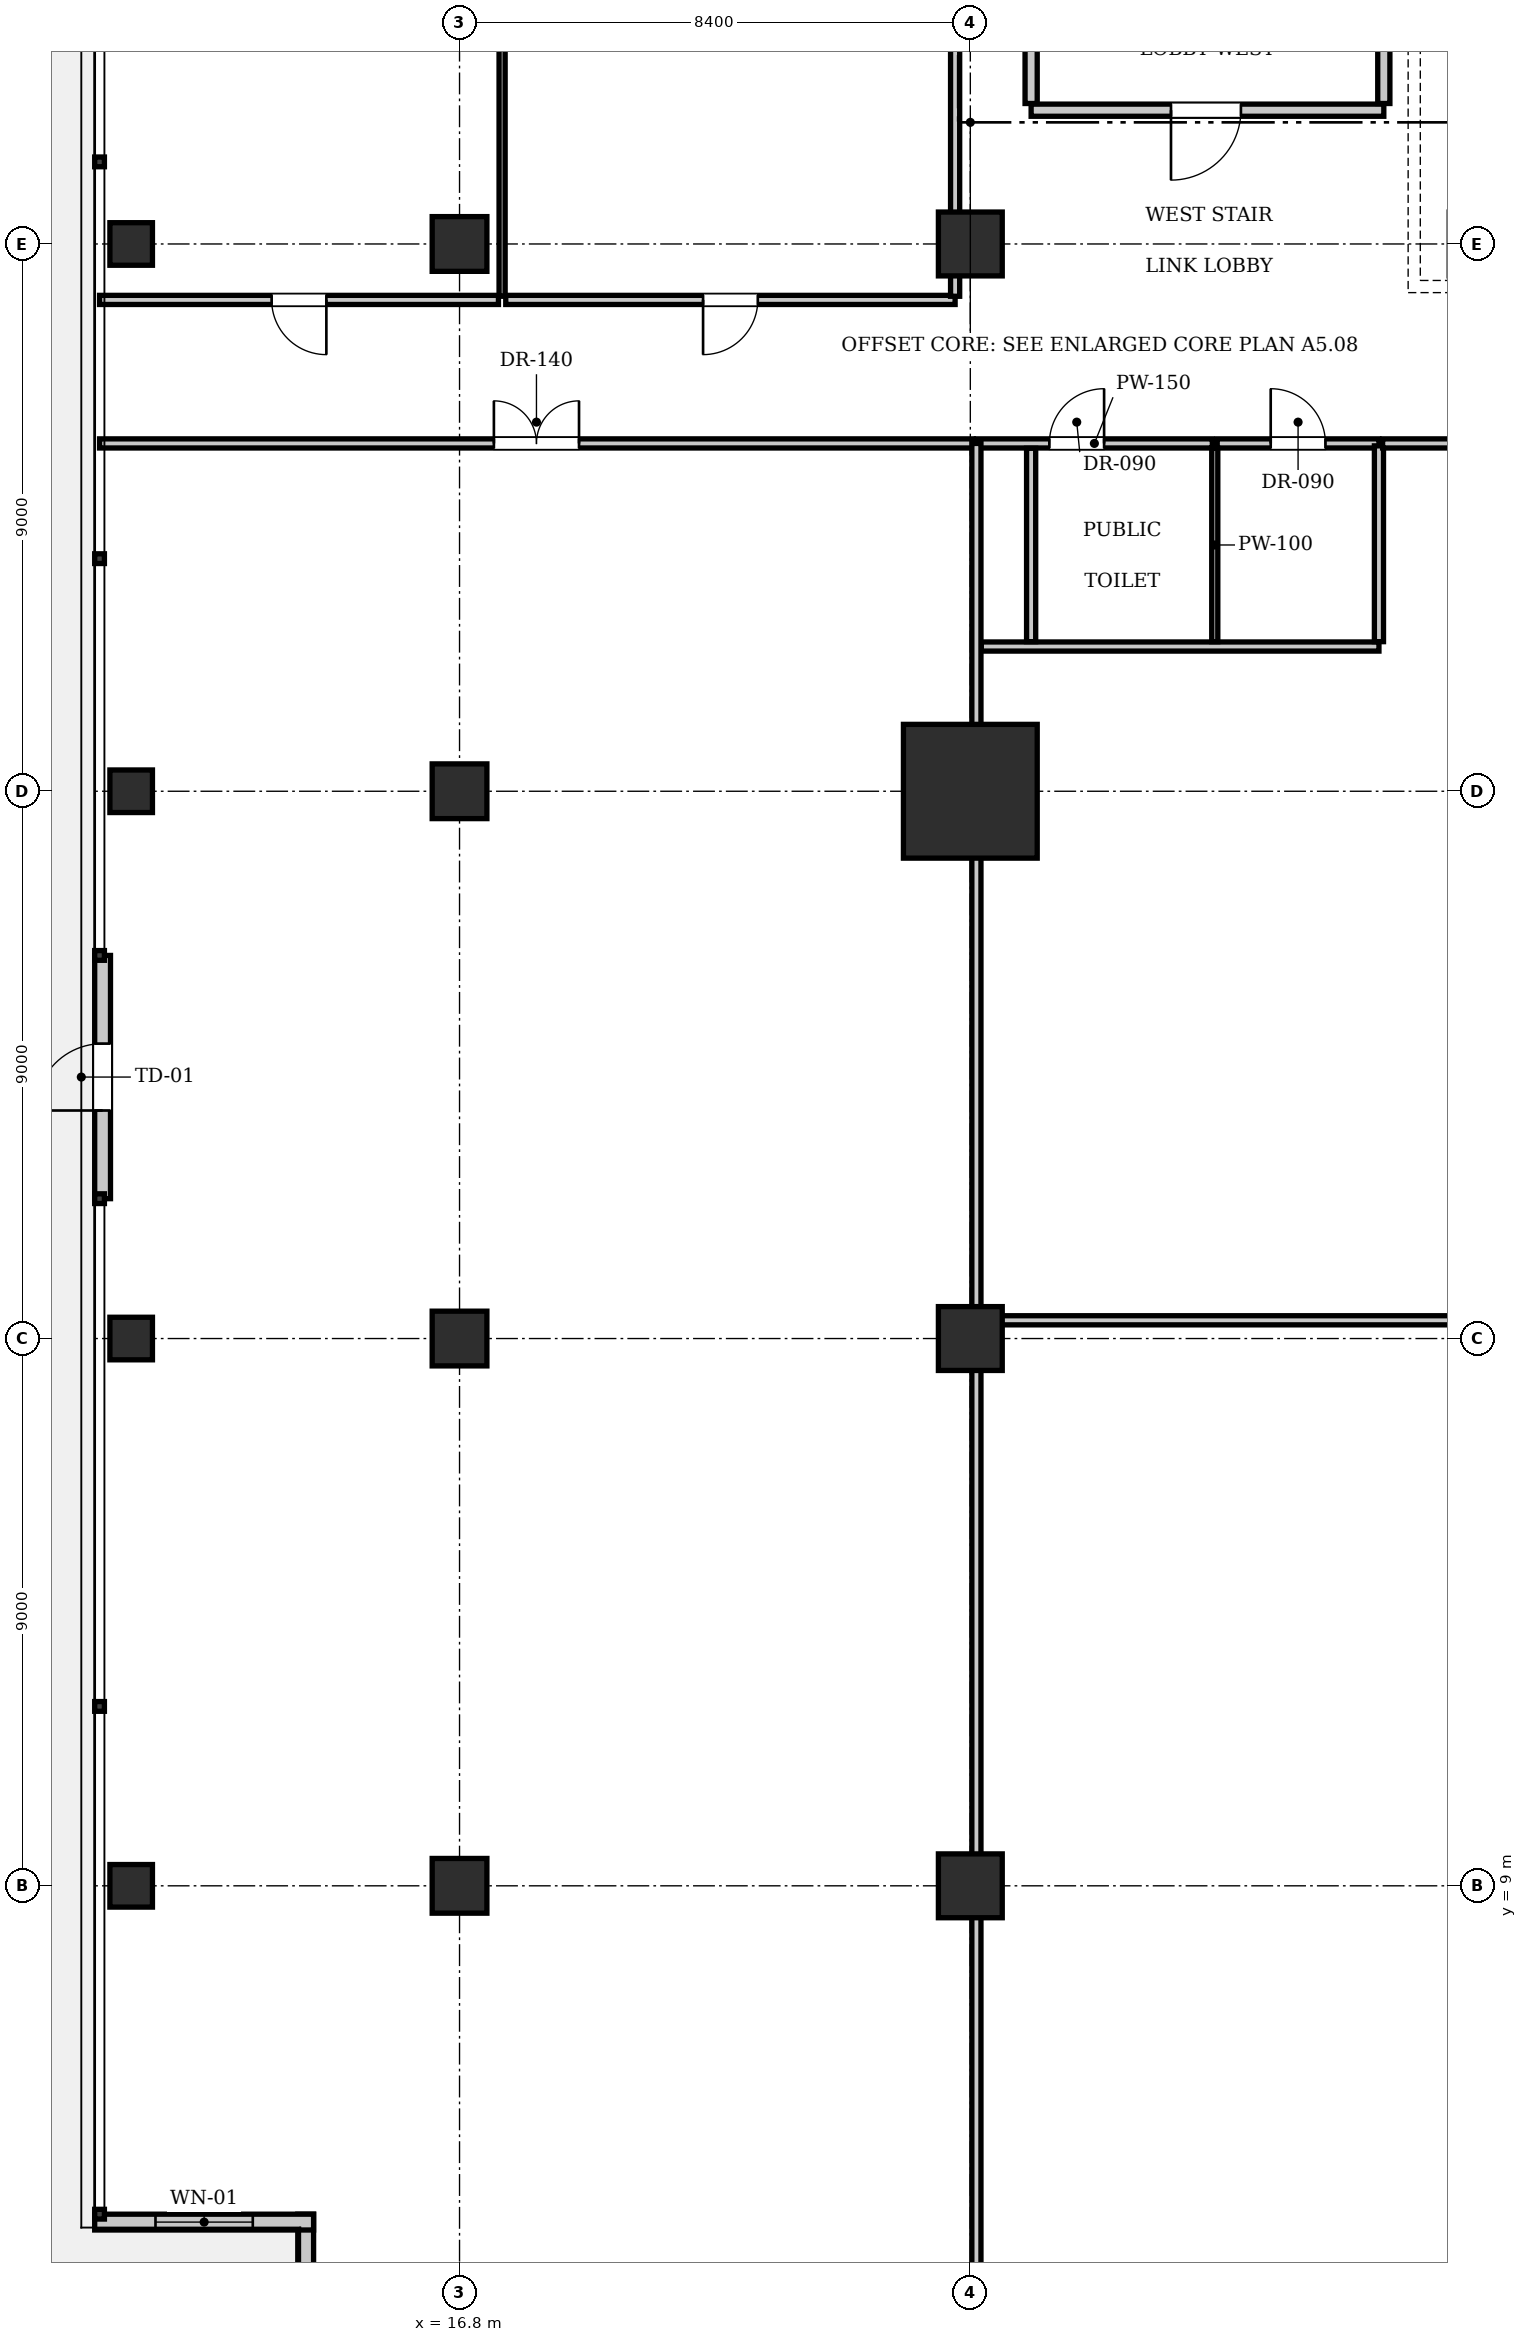
"""IFC4 building model, lengths in metres.
Left out: names, types, materials, properties, quantities, classifications, styles, units other than length and angle.
Written with IfcOpenShell. Run it as: python <this file> out.ifc"""

import sys

from ifc_helpers import new_model, si_unit, direction, frame, frame_2d, origin, origin_2d, place, context, subcontext, project, spatial, rectangle, i_section, extrude, element, fill, save


model = new_model("IFC4")
c1 = context("Model", 3, precision=1e-05, world=origin(), true_north=direction((0.0, 1.0)))
c2 = subcontext(c1, "Body", "Model", "MODEL_VIEW")
j1 = project(units=[si_unit("LENGTHUNIT", "METRE"), si_unit("PLANEANGLEUNIT", "RADIAN")], contexts=[c1])
p1 = place(None, origin())
s1 = spatial("IfcSite", under=j1, at=p1, CompositionType="ELEMENT")
p2 = place(p1, origin())
s2 = spatial("IfcBuilding", under=s1, at=p2, CompositionType="ELEMENT")
p3 = place(p2, frame((0.0, 0.0, 26.95)))
s3 = spatial("IfcBuildingStorey", under=s2, at=p3, CompositionType="ELEMENT", Elevation=26.95)
p4 = place(p3, frame((25.2, 27.0, 0.0), z_axis=(0.0, 0.0, 1.0), x_axis=(1.0, 0.0, 0.0)))
e1 = element("IfcColumn", 1, at=p4, inside=s3, PredefinedType="COLUMN", context=c2, shape_type="SweptSolid", body=[
    extrude(rectangle(XDim=2.2, YDim=2.2, at=origin_2d()), origin(), (0.0, 0.0, 1.0), 3.85),
])
for number, where, z_axis, x_axis in (
    (2, (25.2, 36.0, 0.0), (0.0, 0.0, 1.0), (1.0, 0.0, 0.0)),
    (3, (25.2, 18.0, 0.0), (0.0, 0.0, 1.0), (1.0, 0.0, 0.0)),
    (4, (25.2, 9.0, 0.0), (0.0, 0.0, 1.0), (1.0, 0.0, 0.0)),
):
    element("IfcColumn", number, at=place(p3, frame(where, z_axis=z_axis, x_axis=x_axis)), inside=s3, PredefinedType="COLUMN", context=c2, shape_type="SweptSolid", body=[
        extrude(rectangle(XDim=1.05, YDim=1.05, at=origin_2d()), origin(), (0.0, 0.0, 1.0), 3.85),
    ])
for number, where, z_axis, x_axis in (
    (5, (16.8, 9.0, 0.0), (0.0, 0.0, 1.0), (1.0, 0.0, 0.0)),
    (6, (16.8, 18.0, 0.0), (0.0, 0.0, 1.0), (1.0, 0.0, 0.0)),
    (7, (16.8, 27.0, 0.0), (0.0, 0.0, 1.0), (1.0, 0.0, 0.0)),
    (8, (16.8, 36.0, 0.0), (0.0, 0.0, 1.0), (1.0, 0.0, 0.0)),
):
    element("IfcColumn", number, at=place(p3, frame(where, z_axis=z_axis, x_axis=x_axis)), inside=s3, PredefinedType="COLUMN", context=c2, shape_type="SweptSolid", body=[
        extrude(rectangle(XDim=0.9, YDim=0.9, at=origin_2d()), origin(), (0.0, 0.0, 1.0), 3.85),
    ])
for number, where, z_axis, x_axis in (
    (9, (11.4, 9.0, -0.24), (0.0, 0.0, 1.0), (1.0, 0.0, 0.0)),
    (10, (11.4, 18.0, -0.24), (0.0, 0.0, 1.0), (1.0, 0.0, 0.0)),
    (11, (11.4, 27.0, -0.24), (0.0, 0.0, 1.0), (1.0, 0.0, 0.0)),
    (12, (11.4, 36.0, -0.24), (0.0, 0.0, 1.0), (1.0, 0.0, 0.0)),
):
    element("IfcColumn", number, at=place(p3, frame(where, z_axis=z_axis, x_axis=x_axis)), inside=s3, PredefinedType="COLUMN", context=c2, shape_type="SweptSolid", body=[
        extrude(i_section(OverallWidth=0.7, OverallDepth=0.7, WebThickness=0.028, FlangeThickness=0.044, at=origin_2d()), origin(), (0.0, 0.0, 1.0), 4.09),
    ])
p5 = place(p3, frame((14.27, 0.0, 0.0), z_axis=(0.0, 0.0, 1.0), x_axis=(0.0, 1.0, 0.0)))
e13 = element("IfcWall", 13, at=p5, inside=s3, PredefinedType="SOLIDWALL", context=c2, shape_type="SweptSolid", body=[
    extrude(rectangle(XDim=3.6, YDim=0.26, at=frame_2d((1.8, 0.0))), origin(), (0.0, 0.0, 1.0), 3.61),
])
p6 = place(p3, frame((14.4, 3.47, 0.0), z_axis=(0.0, 0.0, 1.0), x_axis=(-1.0, 0.0, 0.0)))
e14 = element("IfcWall", 14, at=p6, inside=s3, PredefinedType="SOLIDWALL", context=c2, shape_type="SweptSolid", body=[
    extrude(rectangle(XDim=3.6, YDim=0.26, at=frame_2d((1.8, 0.0))), origin(), (0.0, 0.0, 1.0), 3.61),
])
p7 = place(p6, frame((1.0, 0.0, 0.9)))
e15 = element("IfcOpeningElement", 15, at=p7, cuts=e14, PredefinedType="OPENING", context=c2, shape_type="SweptSolid", body=[
    extrude(rectangle(XDim=1.6, YDim=2.1, at=frame_2d((0.8, 1.05))), frame((0.0, 0.14, 0.0), z_axis=(0.0, -1.0, 0.0), x_axis=(1.0, 0.0, 0.0)), (0.0, 0.0, 1.0), 0.28),
])
p8 = place(p3, frame((10.93, 20.3, 0.0), z_axis=(0.0, 0.0, 1.0), x_axis=(0.0, 1.0, 0.0)))
e16 = element("IfcWall", 16, at=p8, inside=s3, PredefinedType="SOLIDWALL", context=c2, shape_type="SweptSolid", body=[
    extrude(rectangle(XDim=4.0, YDim=0.26, at=frame_2d((2.0, 0.0))), origin(), (0.0, 0.0, 1.0), 3.61),
])
p9 = place(p8, frame((1.45, 0.0, 0.0)))
e17 = element("IfcOpeningElement", 17, at=p9, cuts=e16, PredefinedType="OPENING", context=c2, shape_type="SweptSolid", body=[
    extrude(rectangle(XDim=1.1, YDim=2.2, at=frame_2d((0.55, 1.1))), frame((0.0, 0.14, 0.0), z_axis=(0.0, -1.0, 0.0), x_axis=(1.0, 0.0, 0.0)), (0.0, 0.0, 1.0), 0.28),
])
p10 = place(p3, frame((26.2, 38.2, 0.0), z_axis=(0.0, 0.0, 1.0), x_axis=(1.0, 0.0, 0.0)))
e18 = element("IfcWall", 18, at=p10, inside=s3, PredefinedType="PARTITIONING", context=c2, shape_type="SweptSolid", body=[
    extrude(rectangle(XDim=5.8, YDim=0.2, at=frame_2d((2.9, 0.0))), origin(), (0.0, 0.0, 1.0), 3.61),
])
p11 = place(p10, frame((2.3, 0.0, 0.0)))
e19 = element("IfcOpeningElement", 19, at=p11, cuts=e18, PredefinedType="OPENING", context=c2, shape_type="SweptSolid", body=[
    extrude(rectangle(XDim=1.15, YDim=2.15, at=frame_2d((0.575, 1.075))), frame((0.0, 0.11, 0.0), z_axis=(0.0, -1.0, 0.0), x_axis=(1.0, 0.0, 0.0)), (0.0, 0.0, 1.0), 0.22),
])
for number, where, z_axis, x_axis in (
    (20, (26.2, 38.31, 0.0), (0.0, 0.0, 1.0), (0.0, 1.0, 0.0)),
    (21, (32.0, 38.31, 0.0), (0.0, 0.0, 1.0), (0.0, 1.0, 0.0)),
):
    element("IfcWall", number, at=place(p3, frame(where, z_axis=z_axis, x_axis=x_axis)), inside=s3, PredefinedType="PARTITIONING", context=c2, shape_type="SweptSolid", body=[
        extrude(rectangle(XDim=3.07, YDim=0.2, at=frame_2d((1.535, 0.0))), origin(), (0.0, 0.0, 1.0), 3.61),
    ])
p12 = place(p3, frame((25.3, 32.72, 0.0), z_axis=(0.0, 0.0, 1.0), x_axis=(1.0, 0.0, 0.0)))
e22 = element("IfcWall", 22, at=p12, inside=s3, PredefinedType="PARTITIONING", context=c2, shape_type="SweptSolid", body=[
    extrude(rectangle(XDim=3.88, YDim=0.15, at=frame_2d((1.94, 0.0))), origin(), (0.0, 0.0, 1.0), 3.61),
])
p13 = place(p12, frame((1.2, 0.0, 0.0)))
e23 = element("IfcOpeningElement", 23, at=p13, cuts=e22, PredefinedType="OPENING", context=c2, shape_type="SweptSolid", body=[
    extrude(rectangle(XDim=0.9, YDim=2.1, at=frame_2d((0.45, 1.05))), frame((0.0, 0.085, 0.0), z_axis=(0.0, -1.0, 0.0), x_axis=(1.0, 0.0, 0.0)), (0.0, 0.0, 1.0), 0.17),
])
p14 = place(p3, frame((29.26, 32.72, 0.0), z_axis=(0.0, 0.0, 1.0), x_axis=(1.0, 0.0, 0.0)))
e24 = element("IfcWall", 24, at=p14, inside=s3, PredefinedType="PARTITIONING", context=c2, shape_type="SweptSolid", body=[
    extrude(rectangle(XDim=2.66, YDim=0.15, at=frame_2d((1.33, 0.0))), origin(), (0.0, 0.0, 1.0), 3.61),
])
p15 = place(p14, frame((0.88, 0.0, 0.0)))
e25 = element("IfcOpeningElement", 25, at=p15, cuts=e24, PredefinedType="OPENING", context=c2, shape_type="SweptSolid", body=[
    extrude(rectangle(XDim=0.9, YDim=2.1, at=frame_2d((0.45, 1.05))), frame((0.0, 0.085, 0.0), z_axis=(0.0, -1.0, 0.0), x_axis=(1.0, 0.0, 0.0)), (0.0, 0.0, 1.0), 0.17),
])
p16 = place(p3, frame((25.38, 29.38, 0.0), z_axis=(0.0, 0.0, 1.0), x_axis=(1.0, 0.0, 0.0)))
e26 = element("IfcWall", 26, at=p16, inside=s3, PredefinedType="PARTITIONING", context=c2, shape_type="SweptSolid", body=[
    extrude(rectangle(XDim=6.54, YDim=0.15, at=frame_2d((3.27, 0.0))), origin(), (0.0, 0.0, 1.0), 3.61),
])
p17 = place(p3, frame((26.2, 29.46, 0.0), z_axis=(0.0, 0.0, 1.0), x_axis=(0.0, 1.0, 0.0)))
e27 = element("IfcWall", 27, at=p17, inside=s3, PredefinedType="PARTITIONING", context=c2, shape_type="SweptSolid", body=[
    extrude(rectangle(XDim=3.18, YDim=0.15, at=frame_2d((1.59, 0.0))), origin(), (0.0, 0.0, 1.0), 3.61),
])
p18 = place(p3, frame((29.22, 29.46, 0.0), z_axis=(0.0, 0.0, 1.0), x_axis=(0.0, 1.0, 0.0)))
e28 = element("IfcWall", 28, at=p18, inside=s3, PredefinedType="PARTITIONING", context=c2, shape_type="SweptSolid", body=[
    extrude(rectangle(XDim=3.18, YDim=0.1, at=frame_2d((1.59, 0.0))), origin(), (0.0, 0.0, 1.0), 3.61),
])
p19 = place(p3, frame((31.92, 29.46, 0.0), z_axis=(0.0, 0.0, 1.0), x_axis=(0.0, 1.0, 0.0)))
e29 = element("IfcWall", 29, at=p19, inside=s3, PredefinedType="PARTITIONING", context=c2, shape_type="SweptSolid", body=[
    extrude(rectangle(XDim=3.22, YDim=0.15, at=frame_2d((1.61, 0.0))), origin(), (0.0, 0.0, 1.0), 3.61),
])
p20 = place(p3, frame((25.38, 18.3, 0.0), z_axis=(0.0, 0.0, 1.0), x_axis=(1.0, 0.0, 0.0)))
e30 = element("IfcWall", 30, at=p20, inside=s3, PredefinedType="PARTITIONING", context=c2, shape_type="SweptSolid", body=[
    extrude(rectangle(XDim=24.84, YDim=0.15, at=frame_2d((12.42, 0.0))), origin(), (0.0, 0.0, 1.0), 3.61),
])
p21 = place(p20, frame((9.0, 0.0, 0.0)))
e31 = element("IfcOpeningElement", 31, at=p21, cuts=e30, PredefinedType="OPENING", context=c2, shape_type="SweptSolid", body=[
    extrude(rectangle(XDim=1.4, YDim=2.2, at=frame_2d((0.7, 1.1))), frame((0.0, 0.085, 0.0), z_axis=(0.0, -1.0, 0.0), x_axis=(1.0, 0.0, 0.0)), (0.0, 0.0, 1.0), 0.17),
])
p22 = place(p3, frame((10.88, 32.72, 0.0), z_axis=(0.0, 0.0, 1.0), x_axis=(1.0, 0.0, 0.0)))
e32 = element("IfcWall", 32, at=p22, inside=s3, PredefinedType="PARTITIONING", context=c2, shape_type="SweptSolid", body=[
    extrude(rectangle(XDim=14.37, YDim=0.15, at=frame_2d((7.185, 0.0))), origin(), (0.0, 0.0, 1.0), 3.61),
])
p23 = place(p22, frame((6.485, 0.0, 0.0)))
e33 = element("IfcOpeningElement", 33, at=p23, cuts=e32, PredefinedType="OPENING", context=c2, shape_type="SweptSolid", body=[
    extrude(rectangle(XDim=1.4, YDim=2.2, at=frame_2d((0.7, 1.1))), frame((0.0, 0.085, 0.0), z_axis=(0.0, -1.0, 0.0), x_axis=(1.0, 0.0, 0.0)), (0.0, 0.0, 1.0), 0.17),
])
p24 = place(p3, frame((31.98, 32.72, 0.0), z_axis=(0.0, 0.0, 1.0), x_axis=(1.0, 0.0, 0.0)))
e34 = element("IfcWall", 34, at=p24, inside=s3, PredefinedType="PARTITIONING", context=c2, shape_type="SweptSolid", body=[
    extrude(rectangle(XDim=9.07, YDim=0.15, at=frame_2d((4.535, 0.0))), origin(), (0.0, 0.0, 1.0), 3.61),
])
p25 = place(p24, frame((4.085, 0.0, 0.0)))
e35 = element("IfcOpeningElement", 35, at=p25, cuts=e34, PredefinedType="OPENING", context=c2, shape_type="SweptSolid", body=[
    extrude(rectangle(XDim=0.9, YDim=2.1, at=frame_2d((0.45, 1.05))), frame((0.0, 0.085, 0.0), z_axis=(0.0, -1.0, 0.0), x_axis=(1.0, 0.0, 0.0)), (0.0, 0.0, 1.0), 0.17),
])
p26 = place(p3, frame((25.3, 0.08, 0.0), z_axis=(0.0, 0.0, 1.0), x_axis=(0.0, 1.0, 0.0)))
e36 = element("IfcWall", 36, at=p26, inside=s3, PredefinedType="PARTITIONING", context=c2, shape_type="SweptSolid", body=[
    extrude(rectangle(XDim=32.64, YDim=0.15, at=frame_2d((16.32, 0.0))), origin(), (0.0, 0.0, 1.0), 2.975),
])
p27 = place(p3, frame((10.88, 35.08, 0.0), z_axis=(0.0, 0.0, 1.0), x_axis=(1.0, 0.0, 0.0)))
e37 = element("IfcWall", 37, at=p27, inside=s3, PredefinedType="PARTITIONING", context=c2, shape_type="SweptSolid", body=[
    extrude(rectangle(XDim=6.56, YDim=0.15, at=frame_2d((3.28, 0.0))), origin(), (0.0, 0.0, 1.0), 3.61),
])
p28 = place(p27, frame((2.83, 0.0, 0.0)))
e38 = element("IfcOpeningElement", 38, at=p28, cuts=e37, PredefinedType="OPENING", context=c2, shape_type="SweptSolid", body=[
    extrude(rectangle(XDim=0.9, YDim=2.1, at=frame_2d((0.45, 1.05))), frame((0.0, 0.085, 0.0), z_axis=(0.0, -1.0, 0.0), x_axis=(1.0, 0.0, 0.0)), (0.0, 0.0, 1.0), 0.17),
])
p29 = place(p3, frame((17.56, 35.08, 0.0), z_axis=(0.0, 0.0, 1.0), x_axis=(1.0, 0.0, 0.0)))
e39 = element("IfcWall", 39, at=p29, inside=s3, PredefinedType="PARTITIONING", context=c2, shape_type="SweptSolid", body=[
    extrude(rectangle(XDim=7.39, YDim=0.15, at=frame_2d((3.695, 0.0))), origin(), (0.0, 0.0, 1.0), 3.61),
])
p30 = place(p29, frame((3.245, 0.0, 0.0)))
e40 = element("IfcOpeningElement", 40, at=p30, cuts=e39, PredefinedType="OPENING", context=c2, shape_type="SweptSolid", body=[
    extrude(rectangle(XDim=0.9, YDim=2.1, at=frame_2d((0.45, 1.05))), frame((0.0, 0.085, 0.0), z_axis=(0.0, -1.0, 0.0), x_axis=(1.0, 0.0, 0.0)), (0.0, 0.0, 1.0), 0.17),
])
p31 = place(p3, frame((17.5, 35.14, 0.0), z_axis=(0.0, 0.0, 1.0), x_axis=(0.0, 1.0, 0.0)))
e41 = element("IfcWall", 41, at=p31, inside=s3, PredefinedType="PARTITIONING", context=c2, shape_type="SweptSolid", body=[
    extrude(rectangle(XDim=18.78, YDim=0.1, at=frame_2d((9.39, 0.0))), origin(), (0.0, 0.0, 1.0), 3.61),
])
p32 = place(p3, frame((24.95, 35.14, 0.0), z_axis=(0.0, 0.0, 1.0), x_axis=(0.0, 1.0, 0.0)))
e42 = element("IfcWall", 42, at=p32, inside=s3, PredefinedType="PARTITIONING", context=c2, shape_type="SweptSolid", body=[
    extrude(rectangle(XDim=18.78, YDim=0.15, at=frame_2d((9.39, 0.0))), origin(), (0.0, 0.0, 1.0), 3.61),
])
p33 = place(p7, origin())
e43 = element("IfcWindow", 43, at=p33, inside=s3, PartitioningType="SINGLE_PANEL", PredefinedType="WINDOW", context=c2, shape_type="SweptSolid", body=[
    extrude(rectangle(XDim=1.6, YDim=2.1, at=frame_2d((0.8, 1.05))), frame((0.0, 0.03, 0.0), z_axis=(0.0, -1.0, 0.0), x_axis=(1.0, 0.0, 0.0)), (0.0, 0.0, 1.0), 0.06),
])
fill(e15, e43)
p34 = place(p9, origin())
e44 = element("IfcDoor", 44, at=p34, inside=s3, OperationType="SINGLE_SWING_LEFT", PredefinedType="DOOR", context=c2, shape_type="SweptSolid", body=[
    extrude(rectangle(XDim=1.1, YDim=2.2, at=frame_2d((0.55, 1.1))), frame((0.0, 0.025, 0.0), z_axis=(0.0, -1.0, 0.0), x_axis=(1.0, 0.0, 0.0)), (0.0, 0.0, 1.0), 0.05),
])
fill(e17, e44)
p35 = place(p11, frame((1.15, 0.0, 0.0), z_axis=(0.0, 0.0, 1.0), x_axis=(-1.0, 0.0, 0.0)))
e45 = element("IfcDoor", 45, at=p35, inside=s3, OperationType="SINGLE_SWING_RIGHT", PredefinedType="DOOR", context=c2, shape_type="SweptSolid", body=[
    extrude(rectangle(XDim=1.15, YDim=2.15, at=frame_2d((0.575, 1.075))), frame((0.0, 0.025, 0.0), z_axis=(0.0, -1.0, 0.0), x_axis=(1.0, 0.0, 0.0)), (0.0, 0.0, 1.0), 0.05),
])
fill(e19, e45)
p36 = place(p13, origin())
e46 = element("IfcDoor", 46, at=p36, inside=s3, OperationType="SINGLE_SWING_RIGHT", PredefinedType="DOOR", context=c2, shape_type="SweptSolid", body=[
    extrude(rectangle(XDim=0.9, YDim=2.1, at=frame_2d((0.45, 1.05))), frame((0.0, 0.025, 0.0), z_axis=(0.0, -1.0, 0.0), x_axis=(1.0, 0.0, 0.0)), (0.0, 0.0, 1.0), 0.05),
])
fill(e23, e46)
p37 = place(p15, origin())
e47 = element("IfcDoor", 47, at=p37, inside=s3, OperationType="SINGLE_SWING_LEFT", PredefinedType="DOOR", context=c2, shape_type="SweptSolid", body=[
    extrude(rectangle(XDim=0.9, YDim=2.1, at=frame_2d((0.45, 1.05))), frame((0.0, 0.025, 0.0), z_axis=(0.0, -1.0, 0.0), x_axis=(1.0, 0.0, 0.0)), (0.0, 0.0, 1.0), 0.05),
])
fill(e25, e47)
p38 = place(p23, origin())
e48 = element("IfcDoor", 48, at=p38, inside=s3, OperationType="DOUBLE_DOOR_SINGLE_SWING", PredefinedType="DOOR", context=c2, shape_type="SweptSolid", body=[
    extrude(rectangle(XDim=1.4, YDim=2.2, at=frame_2d((0.7, 1.1))), frame((0.0, 0.025, 0.0), z_axis=(0.0, -1.0, 0.0), x_axis=(1.0, 0.0, 0.0)), (0.0, 0.0, 1.0), 0.05),
])
fill(e33, e48)
p39 = place(p28, frame((0.9, 0.0, 0.0), z_axis=(0.0, 0.0, 1.0), x_axis=(-1.0, 0.0, 0.0)))
e49 = element("IfcDoor", 49, at=p39, inside=s3, OperationType="SINGLE_SWING_LEFT", PredefinedType="DOOR", context=c2, shape_type="SweptSolid", body=[
    extrude(rectangle(XDim=0.9, YDim=2.1, at=frame_2d((0.45, 1.05))), frame((0.0, 0.025, 0.0), z_axis=(0.0, -1.0, 0.0), x_axis=(1.0, 0.0, 0.0)), (0.0, 0.0, 1.0), 0.05),
])
fill(e38, e49)
p40 = place(p30, frame((0.9, 0.0, 0.0), z_axis=(0.0, 0.0, 1.0), x_axis=(-1.0, 0.0, 0.0)))
e50 = element("IfcDoor", 50, at=p40, inside=s3, OperationType="SINGLE_SWING_RIGHT", PredefinedType="DOOR", context=c2, shape_type="SweptSolid", body=[
    extrude(rectangle(XDim=0.9, YDim=2.1, at=frame_2d((0.45, 1.05))), frame((0.0, 0.025, 0.0), z_axis=(0.0, -1.0, 0.0), x_axis=(1.0, 0.0, 0.0)), (0.0, 0.0, 1.0), 0.05),
])
fill(e40, e50)
save(model, sys.argv[1])
